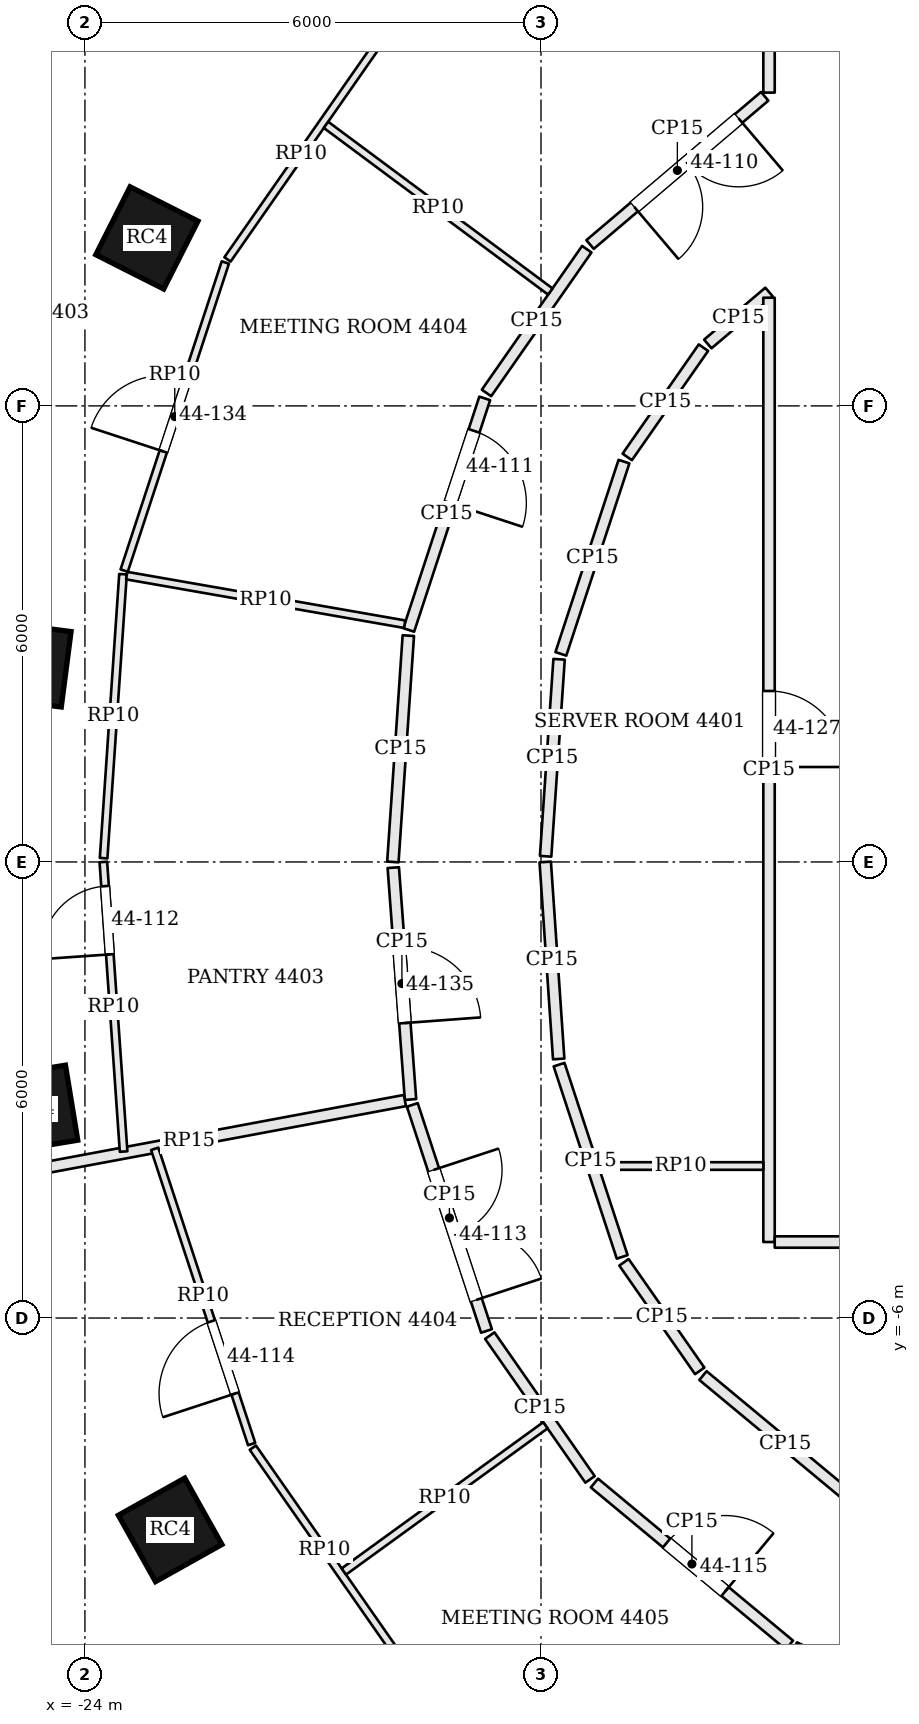
"""IFC4 building model, lengths in metres.
Left out: names, types, materials, properties, quantities, classifications, styles, units other than length and angle.
Written with IfcOpenShell. Run it as: python <this file> out.ifc"""

import sys

from ifc_helpers import new_model, si_unit, direction, frame, frame_2d, origin, origin_2d, place, context, subcontext, project, spatial, rectangle, extrude, element, fill, save


model = new_model("IFC4")
c1 = context("Model", 3, precision=1e-05, world=origin(), true_north=direction((0.0, 1.0)))
c2 = subcontext(c1, "Body", "Model", "MODEL_VIEW")
j1 = project(units=[si_unit("LENGTHUNIT", "METRE"), si_unit("PLANEANGLEUNIT", "RADIAN")], contexts=[c1])
p1 = place(None, origin())
s1 = spatial("IfcSite", under=j1, at=p1, CompositionType="ELEMENT")
p2 = place(p1, origin())
s2 = spatial("IfcBuilding", under=s1, at=p2, CompositionType="ELEMENT")
p3 = place(p2, frame((0.0, 0.0, 181.8)))
s3 = spatial("IfcBuildingStorey", under=s2, at=p3, CompositionType="ELEMENT", Elevation=181.8)
for number, where, z_axis, x_axis in (
    (1, (-23.185, 8.21, 0.0), (0.0, 0.0, 1.0), (-0.451, -0.893, 0.0)),
    (2, (-24.743, 2.599, 0.0), (0.0, 0.0, 1.0), (-0.128, -0.992, 0.0)),
    (3, (-24.669, -3.248, 0.0), (0.0, 0.0, 1.0), (0.162, -0.987, 0.0)),
    (4, (-22.879, -8.787, 0.0), (0.0, 0.0, 1.0), (0.489, -0.873, 0.0)),
):
    element("IfcColumn", number, at=place(p3, frame(where, z_axis=z_axis, x_axis=x_axis)), inside=s3, PredefinedType="COLUMN", context=c2, shape_type="SweptSolid", body=[
        extrude(rectangle(XDim=1.0, YDim=1.0, at=origin_2d()), origin(), (0.0, 0.0, 1.0), 3.9),
    ])
p4 = place(p3, frame((-23.368, 11.701, 0.0), z_axis=(0.0, 0.0, 1.0), x_axis=(-0.850251408633, -0.526376806211, 0.0)))
e5 = element("IfcWall", 5, at=p4, inside=s3, PredefinedType="SOLIDWALL", context=c2, shape_type="SweptSolid", body=[
    extrude(rectangle(XDim=5.302, YDim=0.45, at=frame_2d((2.651, 0.0))), origin(), (0.0, 0.0, 1.0), 3.7),
])
p5 = place(p4, frame((1.601, 0.0, 0.9)))
e6 = element("IfcOpeningElement", 6, at=p5, cuts=e5, PredefinedType="OPENING", context=c2, shape_type="SweptSolid", body=[
    extrude(rectangle(XDim=2.1, YDim=2.3, at=frame_2d((1.05, 1.15))), frame((0.0, 0.235, 0.0), z_axis=(0.0, -1.0, 0.0), x_axis=(1.0, 0.0, 0.0)), (0.0, 0.0, 1.0), 0.47),
])
p6 = place(p3, frame((-24.057, 11.363, 3.9), z_axis=(0.0, 0.0, 1.0), x_axis=(-0.85023666639, -0.526400618471, 0.0)))
e7 = element("IfcWall", 7, at=p6, inside=s3, PredefinedType="PARAPET", context=c2, shape_type="SweptSolid", body=[
    extrude(rectangle(XDim=4.385, YDim=0.3, at=frame_2d((2.192, 0.0))), origin(), (0.0, 0.0, 1.0), 1.1),
])
p7 = place(p3, frame((-15.0, 13.099, 0.0), z_axis=(0.0, 0.0, 1.0), x_axis=(0.0, -1.0, 0.0)))
e8 = element("IfcWall", 8, at=p7, inside=s3, PredefinedType="PARTITIONING", context=c2, shape_type="SweptSolid", body=[
    extrude(rectangle(XDim=2.977, YDim=0.15, at=frame_2d((1.489, 0.0))), origin(), (0.0, 0.0, 1.0), 3.084),
])
p8 = place(p3, frame((-15.057, 10.073, 0.0), z_axis=(0.0, 0.0, 1.0), x_axis=(-0.762398905861, -0.647107339119, 0.0)))
e9 = element("IfcWall", 9, at=p8, inside=s3, PredefinedType="PARTITIONING", context=c2, shape_type="SweptSolid", body=[
    extrude(rectangle(XDim=3.013, YDim=0.15, at=frame_2d((1.507, 0.0))), origin(), (0.0, 0.0, 1.0), 3.084),
])
p9 = place(p8, frame((0.45, 0.0, 0.0)))
e10 = element("IfcOpeningElement", 10, at=p9, cuts=e9, PredefinedType="OPENING", context=c2, shape_type="SweptSolid", body=[
    extrude(rectangle(XDim=1.8, YDim=2.1, at=frame_2d((0.9, 1.05))), frame((0.0, 0.085, 0.0), z_axis=(0.0, -1.0, 0.0), x_axis=(1.0, 0.0, 0.0)), (0.0, 0.0, 1.0), 0.17),
])
p10 = place(p3, frame((-17.397, 8.062, 0.0), z_axis=(0.0, 0.0, 1.0), x_axis=(-0.572118665737, -0.820170855563, 0.0)))
e11 = element("IfcWall", 11, at=p10, inside=s3, PredefinedType="PARTITIONING", context=c2, shape_type="SweptSolid", body=[
    extrude(rectangle(XDim=2.306, YDim=0.15, at=frame_2d((1.153, 0.0))), origin(), (0.0, 0.0, 1.0), 3.084),
])
p11 = place(p3, frame((-18.74, 6.099, 0.0), z_axis=(0.0, 0.0, 1.0), x_axis=(-0.31188427026, -0.950120098706, 0.0)))
e12 = element("IfcWall", 12, at=p11, inside=s3, PredefinedType="PARTITIONING", context=c2, shape_type="SweptSolid", body=[
    extrude(rectangle(XDim=3.206, YDim=0.15, at=frame_2d((1.603, 0.0))), origin(), (0.0, 0.0, 1.0), 3.084),
])
p12 = place(p11, frame((0.45, 0.0, 0.0)))
e13 = element("IfcOpeningElement", 13, at=p12, cuts=e12, PredefinedType="OPENING", context=c2, shape_type="SweptSolid", body=[
    extrude(rectangle(XDim=1.0, YDim=2.4, at=frame_2d((0.5, 1.2))), frame((0.0, 0.085, 0.0), z_axis=(0.0, -1.0, 0.0), x_axis=(1.0, 0.0, 0.0)), (0.0, 0.0, 1.0), 0.17),
])
p13 = place(p3, frame((-19.745, 2.978, 0.0), z_axis=(0.0, 0.0, 1.0), x_axis=(-0.068142324, -0.997675610447, 0.0)))
e14 = element("IfcWall", 14, at=p13, inside=s3, PredefinedType="PARTITIONING", context=c2, shape_type="SweptSolid", body=[
    extrude(rectangle(XDim=2.984, YDim=0.15, at=frame_2d((1.492, 0.0))), origin(), (0.0, 0.0, 1.0), 3.084),
])
p14 = place(p3, frame((-19.943, -0.075, 0.0), z_axis=(0.0, 0.0, 1.0), x_axis=(0.074071611523, -0.997252924973, 0.0)))
e15 = element("IfcWall", 15, at=p14, inside=s3, PredefinedType="PARTITIONING", context=c2, shape_type="SweptSolid", body=[
    extrude(rectangle(XDim=3.059, YDim=0.15, at=frame_2d((1.529, 0.0))), origin(), (0.0, 0.0, 1.0), 3.084),
])
p15 = place(p14, frame((1.05, 0.0, 0.0)))
e16 = element("IfcOpeningElement", 16, at=p15, cuts=e15, PredefinedType="OPENING", context=c2, shape_type="SweptSolid", body=[
    extrude(rectangle(XDim=1.0, YDim=2.1, at=frame_2d((0.5, 1.05))), frame((0.0, 0.085, 0.0), z_axis=(0.0, -1.0, 0.0), x_axis=(1.0, 0.0, 0.0)), (0.0, 0.0, 1.0), 0.17),
])
p16 = place(p3, frame((-25.467, -4.199, 0.0), z_axis=(0.0, 0.0, 1.0), x_axis=(0.982998787258, 0.183612048216, 0.0)))
e17 = element("IfcWall", 17, at=p16, inside=s3, PredefinedType="PARTITIONING", context=c2, shape_type="SweptSolid", body=[
    extrude(rectangle(XDim=5.775, YDim=0.15, at=frame_2d((2.887, 0.0))), origin(), (0.0, 0.0, 1.0), 3.234),
])
p17 = place(p3, frame((-19.693, -3.196, 0.0), z_axis=(0.0, 0.0, 1.0), x_axis=(0.311918951318, -0.950108713679, 0.0)))
e18 = element("IfcWall", 18, at=p17, inside=s3, PredefinedType="PARTITIONING", context=c2, shape_type="SweptSolid", body=[
    extrude(rectangle(XDim=3.13, YDim=0.15, at=frame_2d((1.565, 0.0))), origin(), (0.0, 0.0, 1.0), 3.084),
])
p18 = place(p17, frame((0.9, 0.0, 0.0)))
e19 = element("IfcOpeningElement", 19, at=p18, cuts=e18, PredefinedType="OPENING", context=c2, shape_type="SweptSolid", body=[
    extrude(rectangle(XDim=1.8, YDim=2.1, at=frame_2d((0.9, 1.05))), frame((0.0, 0.085, 0.0), z_axis=(0.0, -1.0, 0.0), x_axis=(1.0, 0.0, 0.0)), (0.0, 0.0, 1.0), 0.17),
])
p19 = place(p3, frame((-18.674, -6.232, 0.0), z_axis=(0.0, 0.0, 1.0), x_axis=(0.572118665737, -0.820170855563, 0.0)))
e20 = element("IfcWall", 20, at=p19, inside=s3, PredefinedType="PARTITIONING", context=c2, shape_type="SweptSolid", body=[
    extrude(rectangle(XDim=2.306, YDim=0.15, at=frame_2d((1.153, 0.0))), origin(), (0.0, 0.0, 1.0), 3.084),
])
p20 = place(p3, frame((-17.297, -8.171, 0.0), z_axis=(0.0, 0.0, 1.0), x_axis=(0.769228575061, -0.638973707839, 0.0)))
e21 = element("IfcWall", 21, at=p20, inside=s3, PredefinedType="PARTITIONING", context=c2, shape_type="SweptSolid", body=[
    extrude(rectangle(XDim=3.334, YDim=0.15, at=frame_2d((1.667, 0.0))), origin(), (0.0, 0.0, 1.0), 3.084),
])
p21 = place(p20, frame((1.234, 0.0, 0.0)))
e22 = element("IfcOpeningElement", 22, at=p21, cuts=e21, PredefinedType="OPENING", context=c2, shape_type="SweptSolid", body=[
    extrude(rectangle(XDim=1.0, YDim=2.4, at=frame_2d((0.5, 1.2))), frame((0.0, 0.085, 0.0), z_axis=(0.0, -1.0, 0.0), x_axis=(1.0, 0.0, 0.0)), (0.0, 0.0, 1.0), 0.17),
])
p22 = place(p3, frame((-14.664, -10.334, 0.0), z_axis=(0.0, 0.0, 1.0), x_axis=(0.901507315282, -0.432763862278, 0.0)))
e23 = element("IfcWall", 23, at=p22, inside=s3, PredefinedType="PARTITIONING", context=c2, shape_type="SweptSolid", body=[
    extrude(rectangle(XDim=3.63, YDim=0.15, at=frame_2d((1.815, 0.0))), origin(), (0.0, 0.0, 1.0), 3.084),
])
p23 = place(p22, frame((1.85, 0.0, 0.0)))
e24 = element("IfcOpeningElement", 24, at=p23, cuts=e23, PredefinedType="OPENING", context=c2, shape_type="SweptSolid", body=[
    extrude(rectangle(XDim=0.9, YDim=2.1, at=frame_2d((0.45, 1.05))), frame((0.0, 0.085, 0.0), z_axis=(0.0, -1.0, 0.0), x_axis=(1.0, 0.0, 0.0)), (0.0, 0.0, 1.0), 0.17),
])
p24 = place(p3, frame((-13.702, -8.557, 0.0), z_axis=(0.0, 0.0, 1.0), x_axis=(-0.769221825067, 0.638981833733, 0.0)))
e25 = element("IfcWall", 25, at=p24, inside=s3, PredefinedType="PARTITIONING", context=c2, shape_type="SweptSolid", body=[
    extrude(rectangle(XDim=2.817, YDim=0.15, at=frame_2d((1.409, 0.0))), origin(), (0.0, 0.0, 1.0), 3.084),
])
p25 = place(p3, frame((-15.912, -6.696, 0.0), z_axis=(0.0, 0.0, 1.0), x_axis=(-0.572078533763, 0.820198848578, 0.0)))
e26 = element("IfcWall", 26, at=p25, inside=s3, PredefinedType="PARTITIONING", context=c2, shape_type="SweptSolid", body=[
    extrude(rectangle(XDim=1.742, YDim=0.15, at=frame_2d((0.871, 0.0))), origin(), (0.0, 0.0, 1.0), 3.084),
])
p26 = place(p3, frame((-16.932, -5.196, 0.0), z_axis=(0.0, 0.0, 1.0), x_axis=(-0.311904957484, 0.950113307715, 0.0)))
e27 = element("IfcWall", 27, at=p26, inside=s3, PredefinedType="PARTITIONING", context=c2, shape_type="SweptSolid", body=[
    extrude(rectangle(XDim=2.662, YDim=0.15, at=frame_2d((1.331, 0.0))), origin(), (0.0, 0.0, 1.0), 3.084),
])
p27 = place(p3, frame((-17.767, -2.592, 0.0), z_axis=(0.0, 0.0, 1.0), x_axis=(-0.068140828228, 0.997675712608, 0.0)))
e28 = element("IfcWall", 28, at=p27, inside=s3, PredefinedType="PARTITIONING", context=c2, shape_type="SweptSolid", body=[
    extrude(rectangle(XDim=2.598, YDim=0.15, at=frame_2d((1.299, 0.0))), origin(), (0.0, 0.0, 1.0), 3.084),
])
p28 = place(p3, frame((-17.939, 0.075, 0.0), z_axis=(0.0, 0.0, 1.0), x_axis=(0.068227980697, 0.997669756307, 0.0)))
e29 = element("IfcWall", 29, at=p28, inside=s3, PredefinedType="PARTITIONING", context=c2, shape_type="SweptSolid", body=[
    extrude(rectangle(XDim=2.598, YDim=0.15, at=frame_2d((1.299, 0.0))), origin(), (0.0, 0.0, 1.0), 3.084),
])
p29 = place(p3, frame((-17.739, 2.738, 0.0), z_axis=(0.0, 0.0, 1.0), x_axis=(0.311904957484, 0.950113307715, 0.0)))
e30 = element("IfcWall", 30, at=p29, inside=s3, PredefinedType="PARTITIONING", context=c2, shape_type="SweptSolid", body=[
    extrude(rectangle(XDim=2.662, YDim=0.15, at=frame_2d((1.331, 0.0))), origin(), (0.0, 0.0, 1.0), 3.084),
])
p30 = place(p3, frame((-16.865, 5.329, 0.0), z_axis=(0.0, 0.0, 1.0), x_axis=(0.572096615639, 0.820186236397, 0.0)))
e31 = element("IfcWall", 31, at=p30, inside=s3, PredefinedType="PARTITIONING", context=c2, shape_type="SweptSolid", body=[
    extrude(rectangle(XDim=1.753, YDim=0.15, at=frame_2d((0.876, 0.0))), origin(), (0.0, 0.0, 1.0), 3.084),
])
p31 = place(p3, frame((-15.805, 6.814, 0.0), z_axis=(0.0, 0.0, 1.0), x_axis=(0.762298381233, 0.647225755027, 0.0)))
e32 = element("IfcWall", 32, at=p31, inside=s3, PredefinedType="PARTITIONING", context=c2, shape_type="SweptSolid", body=[
    extrude(rectangle(XDim=1.057, YDim=0.15, at=frame_2d((0.528, 0.0))), origin(), (0.0, 0.0, 1.0), 3.084),
])
p32 = place(p3, frame((-15.0, 7.423, 0.0), z_axis=(0.0, 0.0, 1.0), x_axis=(0.0, -1.0, 0.0)))
e33 = element("IfcWall", 33, at=p32, inside=s3, PredefinedType="PARTITIONING", context=c2, shape_type="SweptSolid", body=[
    extrude(rectangle(XDim=12.423, YDim=0.15, at=frame_2d((6.211, 0.0))), origin(), (0.0, 0.0, 1.0), 3.084),
])
p33 = place(p32, frame((5.174, 0.0, 0.0)))
e34 = element("IfcOpeningElement", 34, at=p33, cuts=e33, PredefinedType="OPENING", context=c2, shape_type="SweptSolid", body=[
    extrude(rectangle(XDim=1.0, YDim=2.1, at=frame_2d((0.5, 1.05))), frame((0.0, 0.085, 0.0), z_axis=(0.0, -1.0, 0.0), x_axis=(1.0, 0.0, 0.0)), (0.0, 0.0, 1.0), 0.17),
])
p34 = place(p3, frame((-14.925, -5.0, 0.0), z_axis=(0.0, 0.0, 1.0), x_axis=(1.0, 0.0, 0.0)))
e35 = element("IfcWall", 35, at=p34, inside=s3, PredefinedType="PARTITIONING", context=c2, shape_type="SweptSolid", body=[
    extrude(rectangle(XDim=29.925, YDim=0.15, at=frame_2d((14.962, 0.0))), origin(), (0.0, 0.0, 1.0), 3.084),
])
p35 = place(p34, frame((2.175, 0.0, 0.0)))
e36 = element("IfcOpeningElement", 36, at=p35, cuts=e35, PredefinedType="OPENING", context=c2, shape_type="SweptSolid", body=[
    extrude(rectangle(XDim=1.0, YDim=2.1, at=frame_2d((0.5, 1.05))), frame((0.0, 0.085, 0.0), z_axis=(0.0, -1.0, 0.0), x_axis=(1.0, 0.0, 0.0)), (0.0, 0.0, 1.0), 0.17),
])
p36 = place(p34, frame((14.025, 0.0, 0.0)))
e37 = element("IfcOpeningElement", 37, at=p36, cuts=e35, PredefinedType="OPENING", context=c2, shape_type="SweptSolid", body=[
    extrude(rectangle(XDim=1.8, YDim=2.1, at=frame_2d((0.9, 1.05))), frame((0.0, 0.085, 0.0), z_axis=(0.0, -1.0, 0.0), x_axis=(1.0, 0.0, 0.0)), (0.0, 0.0, 1.0), 0.17),
])
p37 = place(p34, frame((26.675, 0.0, 0.0)))
e38 = element("IfcOpeningElement", 38, at=p37, cuts=e35, PredefinedType="OPENING", context=c2, shape_type="SweptSolid", body=[
    extrude(rectangle(XDim=1.0, YDim=2.1, at=frame_2d((0.5, 1.05))), frame((0.0, 0.085, 0.0), z_axis=(0.0, -1.0, 0.0), x_axis=(1.0, 0.0, 0.0)), (0.0, 0.0, 1.0), 0.17),
])
p38 = place(p3, frame((-23.491, -3.81, 0.0), z_axis=(0.0, 0.0, 1.0), x_axis=(-0.069811314636, 0.997560213896, 0.0)))
e39 = element("IfcWall", 39, at=p38, inside=s3, PredefinedType="PARTITIONING", context=c2, shape_type="SweptSolid", body=[
    extrude(rectangle(XDim=3.819, YDim=0.1, at=frame_2d((1.909, 0.0))), origin(), (0.0, 0.0, 1.0), 3.084),
])
p39 = place(p38, frame((2.6, 0.0, 0.0)))
e40 = element("IfcOpeningElement", 40, at=p39, cuts=e39, PredefinedType="OPENING", context=c2, shape_type="SweptSolid", body=[
    extrude(rectangle(XDim=0.9, YDim=2.1, at=frame_2d((0.45, 1.05))), frame((0.0, 0.06, 0.0), z_axis=(0.0, -1.0, 0.0), x_axis=(1.0, 0.0, 0.0)), (0.0, 0.0, 1.0), 0.12),
])
p40 = place(p3, frame((-23.754, 0.05, 0.0), z_axis=(0.0, 0.0, 1.0), x_axis=(0.068193493527, 0.997672114194, 0.0)))
e41 = element("IfcWall", 41, at=p40, inside=s3, PredefinedType="PARTITIONING", context=c2, shape_type="SweptSolid", body=[
    extrude(rectangle(XDim=3.745, YDim=0.1, at=frame_2d((1.873, 0.0))), origin(), (0.0, 0.0, 1.0), 3.084),
])
p41 = place(p3, frame((-23.483, 3.833, 0.0), z_axis=(0.0, 0.0, 1.0), x_axis=(0.311880220566, 0.95012142804, 0.0)))
e42 = element("IfcWall", 42, at=p41, inside=s3, PredefinedType="PARTITIONING", context=c2, shape_type="SweptSolid", body=[
    extrude(rectangle(XDim=4.265, YDim=0.1, at=frame_2d((2.133, 0.0))), origin(), (0.0, 0.0, 1.0), 3.084),
])
p42 = place(p41, frame((1.65, 0.0, 0.0)))
e43 = element("IfcOpeningElement", 43, at=p42, cuts=e42, PredefinedType="OPENING", context=c2, shape_type="SweptSolid", body=[
    extrude(rectangle(XDim=1.0, YDim=2.4, at=frame_2d((0.5, 1.2))), frame((0.0, 0.06, 0.0), z_axis=(0.0, -1.0, 0.0), x_axis=(1.0, 0.0, 0.0)), (0.0, 0.0, 1.0), 0.12),
])
p43 = place(p3, frame((-22.125, 7.927, 0.0), z_axis=(0.0, 0.0, 1.0), x_axis=(0.572100301866, 0.820183665166, 0.0)))
e44 = element("IfcWall", 44, at=p43, inside=s3, PredefinedType="PARTITIONING", context=c2, shape_type="SweptSolid", body=[
    extrude(rectangle(XDim=3.382, YDim=0.1, at=frame_2d((1.691, 0.0))), origin(), (0.0, 0.0, 1.0), 3.084),
])
p44 = place(p3, frame((-17.877, 7.505, 0.0), z_axis=(0.0, 0.0, 1.0), x_axis=(-0.802692989486, 0.596392458563, 0.0)))
e45 = element("IfcWall", 45, at=p44, inside=s3, PredefinedType="PARTITIONING", context=c2, shape_type="SweptSolid", body=[
    extrude(rectangle(XDim=3.677, YDim=0.1, at=frame_2d((1.838, 0.0))), origin(), (0.0, 0.0, 1.0), 3.084),
])
p45 = place(p3, frame((-19.794, 3.128, 0.0), z_axis=(0.0, 0.0, 1.0), x_axis=(-0.985065623684, 0.172179316518, 0.0)))
e46 = element("IfcWall", 46, at=p45, inside=s3, PredefinedType="PARTITIONING", context=c2, shape_type="SweptSolid", body=[
    extrude(rectangle(XDim=3.712, YDim=0.1, at=frame_2d((1.856, 0.0))), origin(), (0.0, 0.0, 1.0), 3.084),
])
p46 = place(p3, frame((-19.909, -10.404, 0.0), z_axis=(0.0, 0.0, 1.0), x_axis=(-0.572111951901, 0.820175538828, 0.0)))
e47 = element("IfcWall", 47, at=p46, inside=s3, PredefinedType="PARTITIONING", context=c2, shape_type="SweptSolid", body=[
    extrude(rectangle(XDim=3.29, YDim=0.1, at=frame_2d((1.645, 0.0))), origin(), (0.0, 0.0, 1.0), 3.084),
])
p47 = place(p3, frame((-21.807, -7.658, 0.0), z_axis=(0.0, 0.0, 1.0), x_axis=(-0.311924580949, 0.950106865463, 0.0)))
e48 = element("IfcWall", 48, at=p47, inside=s3, PredefinedType="PARTITIONING", context=c2, shape_type="SweptSolid", body=[
    extrude(rectangle(XDim=4.088, YDim=0.1, at=frame_2d((2.044, 0.0))), origin(), (0.0, 0.0, 1.0), 3.084),
])
p48 = place(p47, frame((0.699, 0.0, 0.0)))
e49 = element("IfcOpeningElement", 49, at=p48, cuts=e48, PredefinedType="OPENING", context=c2, shape_type="SweptSolid", body=[
    extrude(rectangle(XDim=1.0, YDim=2.1, at=frame_2d((0.5, 1.05))), frame((0.0, 0.06, 0.0), z_axis=(0.0, -1.0, 0.0), x_axis=(1.0, 0.0, 0.0)), (0.0, 0.0, 1.0), 0.12),
])
p49 = place(p3, frame((-17.942, -7.412, 0.0), z_axis=(0.0, 0.0, 1.0), x_axis=(-0.809425321456, -0.587222827372, 0.0)))
e50 = element("IfcWall", 50, at=p49, inside=s3, PredefinedType="PARTITIONING", context=c2, shape_type="SweptSolid", body=[
    extrude(rectangle(XDim=3.275, YDim=0.1, at=frame_2d((1.638, 0.0))), origin(), (0.0, 0.0, 1.0), 3.084),
])
p50 = place(p3, frame((-17.249, -4.0, 0.0), z_axis=(0.0, 0.0, 1.0), x_axis=(1.0, 0.0, 0.0)))
e51 = element("IfcWall", 51, at=p50, inside=s3, PredefinedType="PARTITIONING", context=c2, shape_type="SweptSolid", body=[
    extrude(rectangle(XDim=2.174, YDim=0.1, at=frame_2d((1.087, 0.0))), origin(), (0.0, 0.0, 1.0), 3.084),
])
p51 = place(p9, origin())
e52 = element("IfcDoor", 52, at=p51, inside=s3, OperationType="DOUBLE_DOOR_SINGLE_SWING", PredefinedType="DOOR", context=c2, shape_type="SweptSolid", body=[
    extrude(rectangle(XDim=1.8, YDim=2.1, at=frame_2d((0.9, 1.05))), frame((0.0, 0.025, 0.0), z_axis=(0.0, -1.0, 0.0), x_axis=(1.0, 0.0, 0.0)), (0.0, 0.0, 1.0), 0.05),
])
fill(e10, e52)
p52 = place(p12, origin())
e53 = element("IfcDoor", 53, at=p52, inside=s3, OperationType="SINGLE_SWING_RIGHT", PredefinedType="DOOR", context=c2, shape_type="SweptSolid", body=[
    extrude(rectangle(XDim=1.0, YDim=2.4, at=frame_2d((0.5, 1.2))), frame((0.0, 0.025, 0.0), z_axis=(0.0, -1.0, 0.0), x_axis=(1.0, 0.0, 0.0)), (0.0, 0.0, 1.0), 0.05),
])
fill(e13, e53)
p53 = place(p39, origin())
e54 = element("IfcDoor", 54, at=p53, inside=s3, OperationType="SINGLE_SWING_LEFT", PredefinedType="DOOR", context=c2, shape_type="SweptSolid", body=[
    extrude(rectangle(XDim=0.9, YDim=2.1, at=frame_2d((0.45, 1.05))), frame((0.0, 0.025, 0.0), z_axis=(0.0, -1.0, 0.0), x_axis=(1.0, 0.0, 0.0)), (0.0, 0.0, 1.0), 0.05),
])
fill(e40, e54)
p54 = place(p18, origin())
e55 = element("IfcDoor", 55, at=p54, inside=s3, OperationType="DOUBLE_DOOR_SINGLE_SWING", PredefinedType="DOOR", context=c2, shape_type="SweptSolid", body=[
    extrude(rectangle(XDim=1.8, YDim=2.1, at=frame_2d((0.9, 1.05))), frame((0.0, 0.025, 0.0), z_axis=(0.0, -1.0, 0.0), x_axis=(1.0, 0.0, 0.0)), (0.0, 0.0, 1.0), 0.05),
])
fill(e19, e55)
p55 = place(p48, origin())
e56 = element("IfcDoor", 56, at=p55, inside=s3, OperationType="SINGLE_SWING_LEFT", PredefinedType="DOOR", context=c2, shape_type="SweptSolid", body=[
    extrude(rectangle(XDim=1.0, YDim=2.1, at=frame_2d((0.5, 1.05))), frame((0.0, 0.025, 0.0), z_axis=(0.0, -1.0, 0.0), x_axis=(1.0, 0.0, 0.0)), (0.0, 0.0, 1.0), 0.05),
])
fill(e49, e56)
p56 = place(p21, origin())
e57 = element("IfcDoor", 57, at=p56, inside=s3, OperationType="SINGLE_SWING_RIGHT", PredefinedType="DOOR", context=c2, shape_type="SweptSolid", body=[
    extrude(rectangle(XDim=1.0, YDim=2.4, at=frame_2d((0.5, 1.2))), frame((0.0, 0.025, 0.0), z_axis=(0.0, -1.0, 0.0), x_axis=(1.0, 0.0, 0.0)), (0.0, 0.0, 1.0), 0.05),
])
fill(e22, e57)
p57 = place(p33, origin())
e58 = element("IfcDoor", 58, at=p57, inside=s3, OperationType="SINGLE_SWING_RIGHT", PredefinedType="DOOR", context=c2, shape_type="SweptSolid", body=[
    extrude(rectangle(XDim=1.0, YDim=2.1, at=frame_2d((0.5, 1.05))), frame((0.0, 0.025, 0.0), z_axis=(0.0, -1.0, 0.0), x_axis=(1.0, 0.0, 0.0)), (0.0, 0.0, 1.0), 0.05),
])
fill(e34, e58)
p58 = place(p42, origin())
e59 = element("IfcDoor", 59, at=p58, inside=s3, OperationType="SINGLE_SWING_LEFT", PredefinedType="DOOR", context=c2, shape_type="SweptSolid", body=[
    extrude(rectangle(XDim=1.0, YDim=2.4, at=frame_2d((0.5, 1.2))), frame((0.0, 0.025, 0.0), z_axis=(0.0, -1.0, 0.0), x_axis=(1.0, 0.0, 0.0)), (0.0, 0.0, 1.0), 0.05),
])
fill(e43, e59)
p59 = place(p15, origin())
e60 = element("IfcDoor", 60, at=p59, inside=s3, OperationType="SINGLE_SWING_RIGHT", PredefinedType="DOOR", context=c2, shape_type="SweptSolid", body=[
    extrude(rectangle(XDim=1.0, YDim=2.1, at=frame_2d((0.5, 1.05))), frame((0.0, 0.025, 0.0), z_axis=(0.0, -1.0, 0.0), x_axis=(1.0, 0.0, 0.0)), (0.0, 0.0, 1.0), 0.05),
])
fill(e16, e60)
save(model, sys.argv[1])
